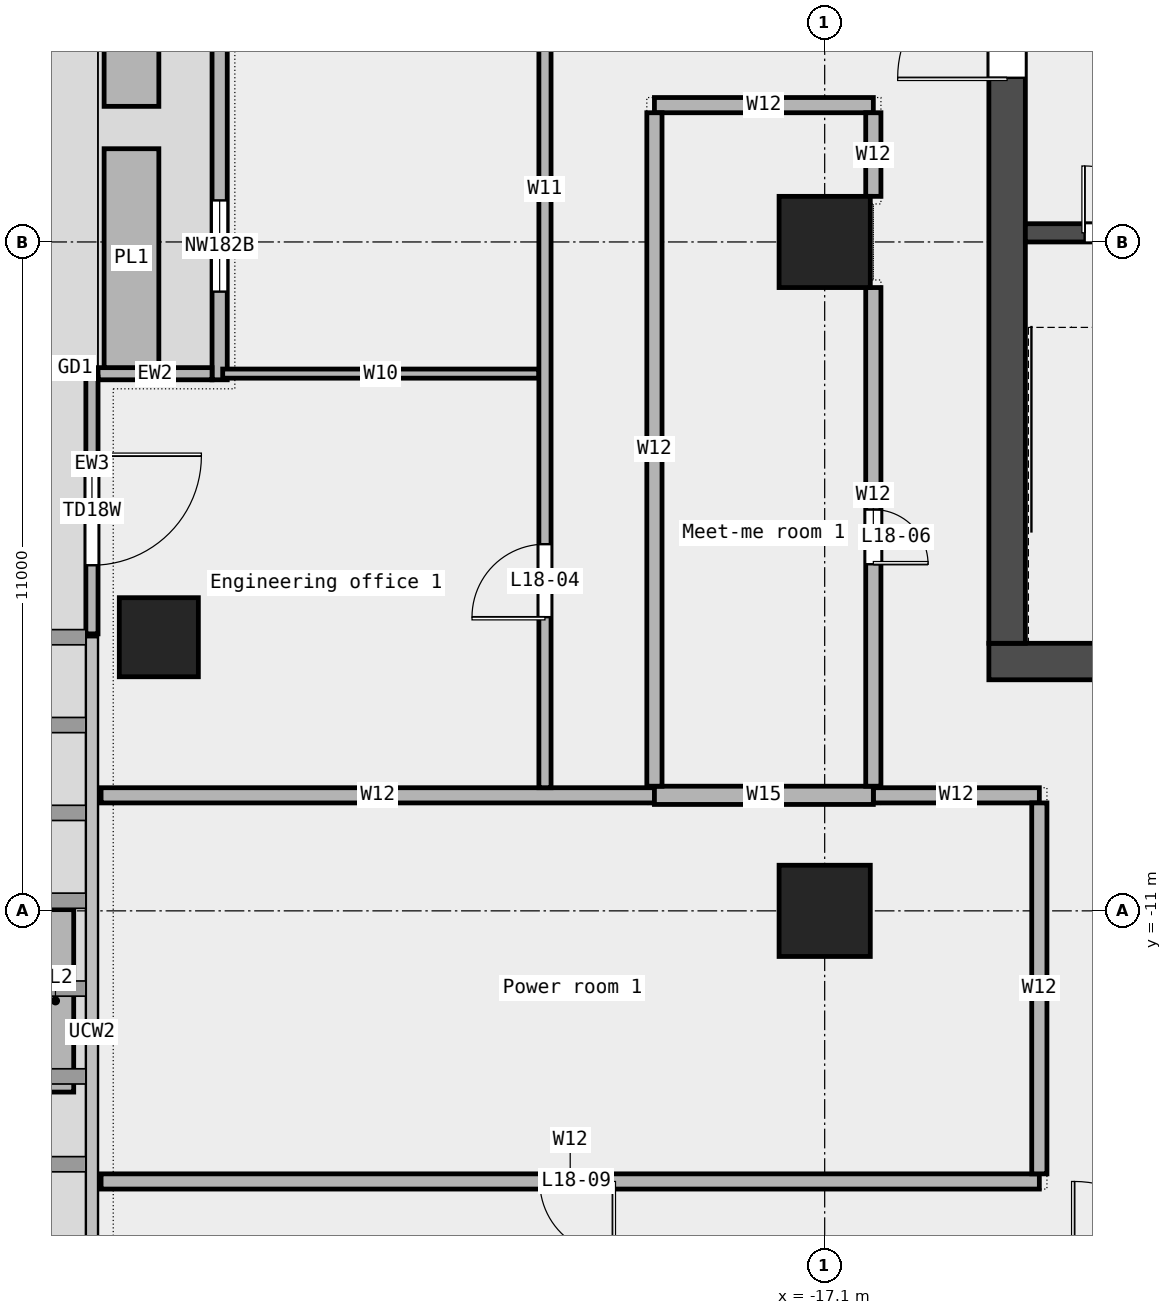
"""IFC4 building model, lengths in metres.
Left out: names, types, materials, properties, quantities, classifications, styles, units other than length and angle.
Written with IfcOpenShell. Run it as: python <this file> out.ifc"""

import sys

from ifc_helpers import new_model, si_unit, direction, frame, frame_2d, origin, origin_2d, place, context, subcontext, project, spatial, rectangle, extrude, element, fill, save


model = new_model("IFC4")
c1 = context("Model", 3, precision=1e-05, world=origin(), true_north=direction((0.0, 1.0)))
c2 = subcontext(c1, "Body", "Model", "MODEL_VIEW")
j1 = project(units=[si_unit("LENGTHUNIT", "METRE"), si_unit("PLANEANGLEUNIT", "RADIAN")], contexts=[c1])
p1 = place(None, origin())
s1 = spatial("IfcSite", under=j1, at=p1, CompositionType="ELEMENT")
p2 = place(p1, origin())
s2 = spatial("IfcBuilding", under=s1, at=p2, CompositionType="ELEMENT")
p3 = place(p2, frame((0.0, 0.0, 94.6)))
s3 = spatial("IfcBuildingStorey", under=s2, at=p3, CompositionType="ELEMENT", Elevation=94.6)
p4 = place(p3, frame((-28.05, -6.5, 0.0), z_axis=(0.0, 0.0, 1.0), x_axis=(1.0, 0.0, 0.0)))
e1 = element("IfcColumn", 1, at=p4, inside=s3, PredefinedType="COLUMN", context=c2, shape_type="SweptSolid", body=[
    extrude(rectangle(XDim=1.3, YDim=1.3, at=origin_2d()), origin(), (0.0, 0.0, 1.0), 4.05),
])
for number, where, z_axis, x_axis in (
    (2, (-17.1, -11.0, 0.0), (0.0, 0.0, 1.0), (1.0, 0.0, 0.0)),
    (3, (-17.1, 0.0, 0.0), (0.0, 0.0, 1.0), (1.0, 0.0, 0.0)),
):
    element("IfcColumn", number, at=place(p3, frame(where, z_axis=z_axis, x_axis=x_axis)), inside=s3, PredefinedType="COLUMN", context=c2, shape_type="SweptSolid", body=[
        extrude(rectangle(XDim=1.5, YDim=1.5, at=origin_2d()), origin(), (0.0, 0.0, 1.0), 4.05),
    ])
p5 = place(p3, frame((-27.05, 10.933, 0.0), z_axis=(0.0, 0.0, 1.0), x_axis=(0.0, -1.0, 0.0)))
e4 = element("IfcWall", 4, at=p5, inside=s3, PredefinedType="STANDARD", context=c2, shape_type="SweptSolid", body=[
    extrude(rectangle(XDim=13.2, YDim=0.25, at=frame_2d((6.6, 0.0))), origin(), (0.0, 0.0, 1.0), 4.05),
])
p6 = place(p5, frame((1.5, 0.0, 0.45)))
e5 = element("IfcOpeningElement", 5, at=p6, cuts=e4, PredefinedType="OPENING", context=c2, shape_type="SweptSolid", body=[
    extrude(rectangle(XDim=1.5, YDim=3.0, at=frame_2d((0.75, 1.5))), frame((0.0, 0.137, 0.0), z_axis=(0.0, -1.0, 0.0), x_axis=(1.0, 0.0, 0.0)), (0.0, 0.0, 1.0), 0.274),
])
p7 = place(p5, frame((5.75, 0.0, 0.0)))
e6 = element("IfcOpeningElement", 6, at=p7, cuts=e4, PredefinedType="OPENING", context=c2, shape_type="SweptSolid", body=[
    extrude(rectangle(XDim=1.8, YDim=2.4, at=frame_2d((0.9, 1.2))), frame((0.0, 0.137, 0.0), z_axis=(0.0, -1.0, 0.0), x_axis=(1.0, 0.0, 0.0)), (0.0, 0.0, 1.0), 0.274),
])
p8 = place(p5, frame((10.25, 0.0, 0.45)))
e7 = element("IfcOpeningElement", 7, at=p8, cuts=e4, PredefinedType="OPENING", context=c2, shape_type="SweptSolid", body=[
    extrude(rectangle(XDim=1.5, YDim=3.0, at=frame_2d((0.75, 1.5))), frame((0.0, 0.137, 0.0), z_axis=(0.0, -1.0, 0.0), x_axis=(1.0, 0.0, 0.0)), (0.0, 0.0, 1.0), 0.274),
])
p9 = place(p3, frame((-29.05, -2.167, 0.0), z_axis=(0.0, 0.0, 1.0), x_axis=(1.0, 0.0, 0.0)))
e8 = element("IfcWall", 8, at=p9, inside=s3, PredefinedType="STANDARD", context=c2, shape_type="SweptSolid", body=[
    extrude(rectangle(XDim=1.875, YDim=0.2, at=frame_2d((0.938, 0.0))), origin(), (0.0, 0.0, 1.0), 4.05),
])
for number, where, z_axis, x_axis in (
    (9, (-28.5, 5.83, 0.0), (0.0, 0.0, 1.0), (0.0, -1.0, 0.0)),
    (10, (-28.5, 1.533, 0.0), (0.0, 0.0, 1.0), (0.0, -1.0, 0.0)),
):
    element("IfcWall", number, at=place(p3, frame(where, z_axis=z_axis, x_axis=x_axis)), inside=s3, PredefinedType="STANDARD", context=c2, shape_type="SweptSolid", body=[
        extrude(rectangle(XDim=3.6, YDim=0.9, at=frame_2d((1.8, 0.0))), origin(), (0.0, 0.0, 1.0), 0.7),
    ])
p10 = place(p3, frame((-29.15, -2.222, 0.0), z_axis=(0.0, 0.0, 1.0), x_axis=(0.0, -1.0, 0.0)))
e11 = element("IfcWall", 11, at=p10, inside=s3, PredefinedType="STANDARD", context=c2, shape_type="SweptSolid", body=[
    extrude(rectangle(XDim=4.223, YDim=0.2, at=frame_2d((2.112, 0.0))), origin(), (0.0, 0.0, 1.0), 4.05),
])
p11 = place(p10, frame((1.295, 0.0, 0.0)))
e12 = element("IfcOpeningElement", 12, at=p11, cuts=e11, PredefinedType="OPENING", context=c2, shape_type="SweptSolid", body=[
    extrude(rectangle(XDim=1.8, YDim=2.4, at=frame_2d((0.9, 1.2))), frame((0.0, 0.112, 0.0), z_axis=(0.0, -1.0, 0.0), x_axis=(1.0, 0.0, 0.0)), (0.0, 0.0, 1.0), 0.224),
])
p12 = place(p3, frame((-29.75, -10.98, 0.0), z_axis=(0.0, 0.0, 1.0), x_axis=(0.0, -1.0, 0.0)))
e13 = element("IfcWall", 13, at=p12, inside=s3, PredefinedType="STANDARD", context=c2, shape_type="SweptSolid", body=[
    extrude(rectangle(XDim=3.0, YDim=0.6, at=frame_2d((1.5, 0.0))), origin(), (0.0, 0.0, 1.0), 0.7),
])
p13 = place(p3, frame((-29.0, -15.45, 0.0), z_axis=(0.0, 0.0, 1.0), x_axis=(1.0, 0.0, 0.0)))
e14 = element("IfcWall", 14, at=p13, inside=s3, PredefinedType="PARTITIONING", context=c2, shape_type="SweptSolid", body=[
    extrude(rectangle(XDim=15.43, YDim=0.25, at=frame_2d((7.715, 0.0))), origin(), (0.0, 0.0, 1.0), 4.05),
])
p14 = place(p13, frame((7.215, 0.0, 0.0)))
e15 = element("IfcOpeningElement", 15, at=p14, cuts=e14, PredefinedType="OPENING", context=c2, shape_type="SweptSolid", body=[
    extrude(rectangle(XDim=1.2, YDim=2.1, at=frame_2d((0.6, 1.05))), frame((0.0, 0.137, 0.0), z_axis=(0.0, -1.0, 0.0), x_axis=(1.0, 0.0, 0.0)), (0.0, 0.0, 1.0), 0.274),
])
p15 = place(p3, frame((-29.0, -9.1, 0.0), z_axis=(0.0, 0.0, 1.0), x_axis=(1.0, 0.0, 0.0)))
e16 = element("IfcWall", 16, at=p15, inside=s3, PredefinedType="PARTITIONING", context=c2, shape_type="SweptSolid", body=[
    extrude(rectangle(XDim=9.1, YDim=0.25, at=frame_2d((4.55, 0.0))), origin(), (0.0, 0.0, 1.0), 4.05),
])
p16 = place(p3, frame((-16.3, -9.1, 0.0), z_axis=(0.0, 0.0, 1.0), x_axis=(1.0, 0.0, 0.0)))
e17 = element("IfcWall", 17, at=p16, inside=s3, PredefinedType="PARTITIONING", context=c2, shape_type="SweptSolid", body=[
    extrude(rectangle(XDim=2.73, YDim=0.25, at=frame_2d((1.365, 0.0))), origin(), (0.0, 0.0, 1.0), 4.05),
])
p17 = place(p3, frame((-19.9, -9.1, 0.0), z_axis=(0.0, 0.0, 1.0), x_axis=(1.0, 0.0, 0.0)))
e18 = element("IfcWall", 18, at=p17, inside=s3, PredefinedType="PARTITIONING", context=c2, shape_type="SweptSolid", body=[
    extrude(rectangle(XDim=3.6, YDim=0.3, at=frame_2d((1.8, 0.0))), origin(), (0.0, 0.0, 1.0), 4.05),
])
p18 = place(p3, frame((-27.0, -2.165, 0.0), z_axis=(0.0, 0.0, 1.0), x_axis=(1.0, 0.0, 0.0)))
e19 = element("IfcWall", 19, at=p18, inside=s3, PredefinedType="PARTITIONING", context=c2, shape_type="SweptSolid", body=[
    extrude(rectangle(XDim=5.2, YDim=0.15, at=frame_2d((2.6, 0.0))), origin(), (0.0, 0.0, 1.0), 4.05),
])
p19 = place(p3, frame((-19.9, 2.25, 0.0), z_axis=(0.0, 0.0, 1.0), x_axis=(1.0, 0.0, 0.0)))
e20 = element("IfcWall", 20, at=p19, inside=s3, PredefinedType="PARTITIONING", context=c2, shape_type="SweptSolid", body=[
    extrude(rectangle(XDim=3.6, YDim=0.25, at=frame_2d((1.8, 0.0))), origin(), (0.0, 0.0, 1.0), 4.05),
])
p20 = place(p3, frame((-21.7, -8.975, 0.0), z_axis=(0.0, 0.0, 1.0), x_axis=(0.0, 1.0, 0.0)))
e21 = element("IfcWall", 21, at=p20, inside=s3, PredefinedType="PARTITIONING", context=c2, shape_type="SweptSolid", body=[
    extrude(rectangle(XDim=19.685, YDim=0.2, at=frame_2d((9.843, 0.0))), origin(), (0.0, 0.0, 1.0), 4.05),
])
p21 = place(p20, frame((2.805, 0.0, 0.0)))
e22 = element("IfcOpeningElement", 22, at=p21, cuts=e21, PredefinedType="OPENING", context=c2, shape_type="SweptSolid", body=[
    extrude(rectangle(XDim=1.2, YDim=2.1, at=frame_2d((0.6, 1.05))), frame((0.0, 0.112, 0.0), z_axis=(0.0, -1.0, 0.0), x_axis=(1.0, 0.0, 0.0)), (0.0, 0.0, 1.0), 0.224),
])
p22 = place(p20, frame((12.647, 0.0, 0.0)))
e23 = element("IfcOpeningElement", 23, at=p22, cuts=e21, PredefinedType="OPENING", context=c2, shape_type="SweptSolid", body=[
    extrude(rectangle(XDim=1.2, YDim=2.1, at=frame_2d((0.6, 1.05))), frame((0.0, 0.112, 0.0), z_axis=(0.0, -1.0, 0.0), x_axis=(1.0, 0.0, 0.0)), (0.0, 0.0, 1.0), 0.224),
])
p23 = place(p3, frame((-19.9, -8.95, 0.0), z_axis=(0.0, 0.0, 1.0), x_axis=(0.0, 1.0, 0.0)))
e24 = element("IfcWall", 24, at=p23, inside=s3, PredefinedType="PARTITIONING", context=c2, shape_type="SweptSolid", body=[
    extrude(rectangle(XDim=11.075, YDim=0.25, at=frame_2d((5.538, 0.0))), origin(), (0.0, 0.0, 1.0), 4.05),
])
p24 = place(p3, frame((-16.3, -8.95, 0.0), z_axis=(0.0, 0.0, 1.0), x_axis=(0.0, 1.0, 0.0)))
e25 = element("IfcWall", 25, at=p24, inside=s3, PredefinedType="PARTITIONING", context=c2, shape_type="SweptSolid", body=[
    extrude(rectangle(XDim=8.2, YDim=0.25, at=frame_2d((4.1, 0.0))), origin(), (0.0, 0.0, 1.0), 4.05),
])
p25 = place(p24, frame((3.65, 0.0, 0.0)))
e26 = element("IfcOpeningElement", 26, at=p25, cuts=e25, PredefinedType="OPENING", context=c2, shape_type="SweptSolid", body=[
    extrude(rectangle(XDim=0.9, YDim=2.1, at=frame_2d((0.45, 1.05))), frame((0.0, 0.137, 0.0), z_axis=(0.0, -1.0, 0.0), x_axis=(1.0, 0.0, 0.0)), (0.0, 0.0, 1.0), 0.274),
])
p26 = place(p3, frame((-16.3, 0.75, 0.0), z_axis=(0.0, 0.0, 1.0), x_axis=(0.0, 1.0, 0.0)))
e27 = element("IfcWall", 27, at=p26, inside=s3, PredefinedType="PARTITIONING", context=c2, shape_type="SweptSolid", body=[
    extrude(rectangle(XDim=1.375, YDim=0.25, at=frame_2d((0.688, 0.0))), origin(), (0.0, 0.0, 1.0), 4.05),
])
p27 = place(p3, frame((-13.57, -15.325, 0.0), z_axis=(0.0, 0.0, 1.0), x_axis=(0.0, 1.0, 0.0)))
e28 = element("IfcWall", 28, at=p27, inside=s3, PredefinedType="PARTITIONING", context=c2, shape_type="SweptSolid", body=[
    extrude(rectangle(XDim=6.1, YDim=0.25, at=frame_2d((3.05, 0.0))), origin(), (0.0, 0.0, 1.0), 4.05),
])
p28 = place(p3, frame((-14.4, -6.9, 0.0), z_axis=(0.0, 0.0, 1.0), x_axis=(1.0, 0.0, 0.0)))
e29 = element("IfcWall", 29, at=p28, inside=s3, PredefinedType="SHEAR", context=c2, shape_type="SweptSolid", body=[
    extrude(rectangle(XDim=28.8, YDim=0.6, at=frame_2d((14.4, 0.0))), origin(), (0.0, 0.0, 1.0), 4.2),
])
p29 = place(p28, frame((5.462, 0.0, 0.0)))
e30 = element("IfcOpeningElement", 30, at=p29, cuts=e29, PredefinedType="OPENING", context=c2, shape_type="SweptSolid", body=[
    extrude(rectangle(XDim=1.0, YDim=2.1, at=frame_2d((0.5, 1.05))), frame((0.0, 0.312, 0.0), z_axis=(0.0, -1.0, 0.0), x_axis=(1.0, 0.0, 0.0)), (0.0, 0.0, 1.0), 0.624),
])
p30 = place(p28, frame((10.425, 0.0, 0.0)))
e31 = element("IfcOpeningElement", 31, at=p30, cuts=e29, PredefinedType="OPENING", context=c2, shape_type="SweptSolid", body=[
    extrude(rectangle(XDim=1.2, YDim=2.1, at=frame_2d((0.6, 1.05))), frame((0.0, 0.312, 0.0), z_axis=(0.0, -1.0, 0.0), x_axis=(1.0, 0.0, 0.0)), (0.0, 0.0, 1.0), 0.624),
])
p31 = place(p28, frame((15.025, 0.0, 0.0)))
e32 = element("IfcOpeningElement", 32, at=p31, cuts=e29, PredefinedType="OPENING", context=c2, shape_type="SweptSolid", body=[
    extrude(rectangle(XDim=1.0, YDim=2.1, at=frame_2d((0.5, 1.05))), frame((0.0, 0.312, 0.0), z_axis=(0.0, -1.0, 0.0), x_axis=(1.0, 0.0, 0.0)), (0.0, 0.0, 1.0), 0.624),
])
p32 = place(p28, frame((18.75, 0.0, 0.0)))
e33 = element("IfcOpeningElement", 33, at=p32, cuts=e29, PredefinedType="OPENING", context=c2, shape_type="SweptSolid", body=[
    extrude(rectangle(XDim=1.8, YDim=2.1, at=frame_2d((0.9, 1.05))), frame((0.0, 0.312, 0.0), z_axis=(0.0, -1.0, 0.0), x_axis=(1.0, 0.0, 0.0)), (0.0, 0.0, 1.0), 0.624),
])
p33 = place(p28, frame((23.087, 0.0, 0.0)))
e34 = element("IfcOpeningElement", 34, at=p33, cuts=e29, PredefinedType="OPENING", context=c2, shape_type="SweptSolid", body=[
    extrude(rectangle(XDim=1.0, YDim=2.1, at=frame_2d((0.5, 1.05))), frame((0.0, 0.312, 0.0), z_axis=(0.0, -1.0, 0.0), x_axis=(1.0, 0.0, 0.0)), (0.0, 0.0, 1.0), 0.624),
])
p34 = place(p3, frame((-14.1, -6.6, 0.0), z_axis=(0.0, 0.0, 1.0), x_axis=(0.0, 1.0, 0.0)))
e35 = element("IfcWall", 35, at=p34, inside=s3, PredefinedType="SHEAR", context=c2, shape_type="SweptSolid", body=[
    extrude(rectangle(XDim=19.5, YDim=0.6, at=frame_2d((9.75, 0.0))), origin(), (0.0, 0.0, 1.0), 4.2),
])
p35 = place(p34, frame((9.3, 0.0, 0.0)))
e36 = element("IfcOpeningElement", 36, at=p35, cuts=e35, PredefinedType="OPENING", context=c2, shape_type="SweptSolid", body=[
    extrude(rectangle(XDim=1.8, YDim=2.1, at=frame_2d((0.9, 1.05))), frame((0.0, 0.312, 0.0), z_axis=(0.0, -1.0, 0.0), x_axis=(1.0, 0.0, 0.0)), (0.0, 0.0, 1.0), 0.624),
])
p36 = place(p3, frame((-13.8, 0.15, 0.0), z_axis=(0.0, 0.0, 1.0), x_axis=(1.0, 0.0, 0.0)))
e37 = element("IfcWall", 37, at=p36, inside=s3, PredefinedType="SOLIDWALL", context=c2, shape_type="SweptSolid", body=[
    extrude(rectangle(XDim=3.15, YDim=0.3, at=frame_2d((1.575, 0.0))), origin(), (0.0, 0.0, 1.0), 4.2),
])
p37 = place(p36, frame((0.975, 0.0, 0.0)))
e38 = element("IfcOpeningElement", 38, at=p37, cuts=e37, PredefinedType="OPENING", context=c2, shape_type="SweptSolid", body=[
    extrude(rectangle(XDim=1.1, YDim=2.1, at=frame_2d((0.55, 1.05))), frame((0.0, 0.162, 0.0), z_axis=(0.0, -1.0, 0.0), x_axis=(1.0, 0.0, 0.0)), (0.0, 0.0, 1.0), 0.324),
])
p38 = place(p8, origin())
e39 = element("IfcWindow", 39, at=p38, inside=s3, PartitioningType="SINGLE_PANEL", PredefinedType="WINDOW", context=c2, shape_type="SweptSolid", body=[
    extrude(rectangle(XDim=1.5, YDim=3.0, at=frame_2d((0.75, 1.5))), frame((0.0, 0.03, 0.0), z_axis=(0.0, -1.0, 0.0), x_axis=(1.0, 0.0, 0.0)), (0.0, 0.0, 1.0), 0.06),
])
fill(e7, e39)
p39 = place(p11, origin())
e40 = element("IfcDoor", 40, at=p39, inside=s3, OperationType="DOUBLE_DOOR_SINGLE_SWING", PredefinedType="DOOR", context=c2, shape_type="SweptSolid", body=[
    extrude(rectangle(XDim=1.8, YDim=2.4, at=frame_2d((0.9, 1.2))), frame((0.0, 0.025, 0.0), z_axis=(0.0, -1.0, 0.0), x_axis=(1.0, 0.0, 0.0)), (0.0, 0.0, 1.0), 0.05),
])
fill(e12, e40)
p40 = place(p21, origin())
e41 = element("IfcDoor", 41, at=p40, inside=s3, OperationType="SINGLE_SWING_LEFT", PredefinedType="DOOR", context=c2, shape_type="SweptSolid", body=[
    extrude(rectangle(XDim=1.2, YDim=2.1, at=frame_2d((0.6, 1.05))), frame((0.0, 0.025, 0.0), z_axis=(0.0, -1.0, 0.0), x_axis=(1.0, 0.0, 0.0)), (0.0, 0.0, 1.0), 0.05),
])
fill(e22, e41)
p41 = place(p25, origin())
e42 = element("IfcDoor", 42, at=p41, inside=s3, OperationType="SINGLE_SWING_RIGHT", PredefinedType="DOOR", context=c2, shape_type="SweptSolid", body=[
    extrude(rectangle(XDim=0.9, YDim=2.1, at=frame_2d((0.45, 1.05))), frame((0.0, 0.025, 0.0), z_axis=(0.0, -1.0, 0.0), x_axis=(1.0, 0.0, 0.0)), (0.0, 0.0, 1.0), 0.05),
])
fill(e26, e42)
p42 = place(p14, origin())
e43 = element("IfcDoor", 43, at=p42, inside=s3, OperationType="SINGLE_SWING_LEFT", PredefinedType="DOOR", context=c2, shape_type="SweptSolid", body=[
    extrude(rectangle(XDim=1.2, YDim=2.1, at=frame_2d((0.6, 1.05))), frame((0.0, 0.025, 0.0), z_axis=(0.0, -1.0, 0.0), x_axis=(1.0, 0.0, 0.0)), (0.0, 0.0, 1.0), 0.05),
])
fill(e15, e43)
p43 = place(p37, origin())
e44 = element("IfcDoor", 44, at=p43, inside=s3, OperationType="SINGLE_SWING_LEFT", PredefinedType="DOOR", context=c2, shape_type="SweptSolid", body=[
    extrude(rectangle(XDim=1.1, YDim=2.1, at=frame_2d((0.55, 1.05))), frame((0.0, 0.025, 0.0), z_axis=(0.0, -1.0, 0.0), x_axis=(1.0, 0.0, 0.0)), (0.0, 0.0, 1.0), 0.05),
])
fill(e38, e44)
p44 = place(p35, origin())
e45 = element("IfcDoor", 45, at=p44, inside=s3, OperationType="DOUBLE_DOOR_SINGLE_SWING", PredefinedType="DOOR", context=c2, shape_type="SweptSolid", body=[
    extrude(rectangle(XDim=1.8, YDim=2.1, at=frame_2d((0.9, 1.05))), frame((0.0, 0.025, 0.0), z_axis=(0.0, -1.0, 0.0), x_axis=(1.0, 0.0, 0.0)), (0.0, 0.0, 1.0), 0.05),
])
fill(e36, e45)
save(model, sys.argv[1])
